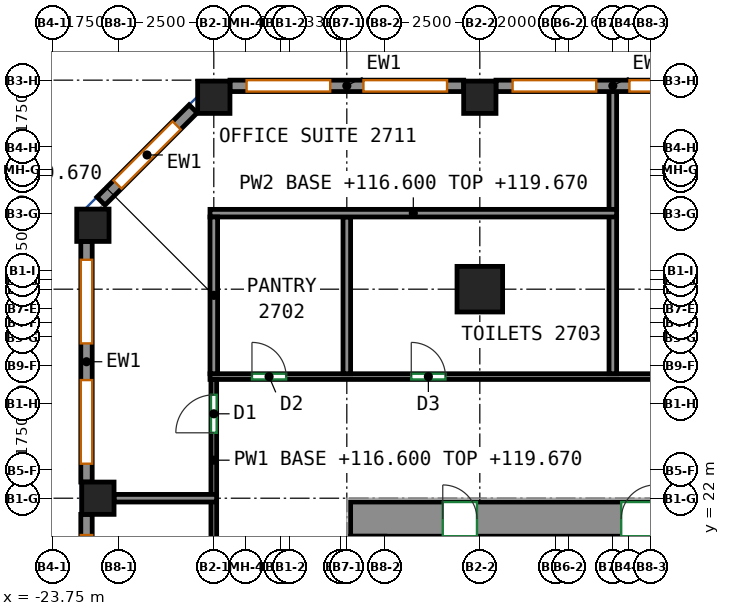
"""IFC4 building model, lengths in metres.
Left out: names, types, materials, properties, quantities, classifications, styles, units other than length and angle.
Written with IfcOpenShell. Run it as: python <this file> out.ifc"""

import sys

from ifc_helpers import new_model, si_unit, direction, frame, frame_2d, origin, origin_2d, place, context, subcontext, project, spatial, rectangle, extrude, source, transform, mapped, element, fill, save


model = new_model("IFC4")
c1 = context("Model", 3, precision=1e-05, world=origin(), true_north=direction((0.0, 1.0)))
c2 = subcontext(c1, "Body", "Model", "MODEL_VIEW")
j1 = project(units=[si_unit("LENGTHUNIT", "METRE"), si_unit("PLANEANGLEUNIT", "RADIAN")], contexts=[c1])
p1 = place(None, origin())
s1 = spatial("IfcSite", under=j1, at=p1, CompositionType="ELEMENT")
p2 = place(p1, origin())
s2 = spatial("IfcBuilding", under=s1, at=p2, CompositionType="ELEMENT")
p3 = place(p2, frame((0.0, 0.0, 116.6)))
s3 = spatial("IfcBuildingStorey", under=s2, at=p3, CompositionType="ELEMENT", Elevation=116.6)
m1 = source(origin(), c2, "Body", "SweptSolid", [
    extrude(rectangle(XDim=0.85, YDim=0.85, at=origin_2d()), origin(), (0.0, 0.0, 1.0), 3.72),
])
for number, where, z_axis, x_axis in (
    (1, (-22.682, 29.182, 0.0), (0.0, 0.0, 1.0), (1.0, 0.0, 0.0)),
    (2, (-22.55, 22.0, 0.0), (0.0, 0.0, 1.0), (1.0, 0.0, 0.0)),
    (3, (-19.5, 32.55, 0.0), (0.0, 0.0, 1.0), (1.0, 0.0, 0.0)),
):
    element("IfcColumn", number, at=place(p3, frame(where, z_axis=z_axis, x_axis=x_axis)), inside=s3, PredefinedType="COLUMN", context=c2, shape_type="MappedRepresentation", body=[
        mapped(m1, transform((0.0, 0.0, 0.0))),
    ])
m2 = source(origin(), c2, "Body", "SweptSolid", [
    extrude(rectangle(XDim=1.2, YDim=1.2, at=origin_2d()), origin(), (0.0, 0.0, 1.0), 3.72),
])
p4 = place(p3, frame((-12.5, 27.5, 0.0), z_axis=(0.0, 0.0, 1.0), x_axis=(1.0, 0.0, 0.0)))
e4 = element("IfcColumn", 4, at=p4, inside=s3, PredefinedType="COLUMN", context=c2, shape_type="MappedRepresentation", body=[
    mapped(m2, transform((0.0, 0.0, 0.0))),
])
p5 = place(p3, frame((-12.5, 32.55, 0.0), z_axis=(0.0, 0.0, 1.0), x_axis=(1.0, 0.0, 0.0)))
e5 = element("IfcColumn", 5, at=p5, inside=s3, PredefinedType="COLUMN", context=c2, shape_type="MappedRepresentation", body=[
    mapped(m1, transform((0.0, 0.0, 0.0))),
])
m3 = source(origin(), c2, "Body", "SweptSolid", [
    extrude(rectangle(XDim=33.9, YDim=0.9, at=frame_2d((16.95, 0.0))), origin(), (0.0, 0.0, 1.0), 3.72),
])
p6 = place(p3, frame((-15.9, 21.45, 0.0), z_axis=(0.0, 0.0, 1.0), x_axis=(1.0, 0.0, 0.0)))
e6 = element("IfcWall", 6, at=p6, inside=s3, PredefinedType="SHEAR", context=c2, shape_type="MappedRepresentation", body=[
    mapped(m3, transform((0.0, 0.0, 0.0))),
])
p7 = place(p6, frame((7.12, 0.0, 0.0)))
e7 = element("IfcOpeningElement", 7, at=p7, cuts=e6, PredefinedType="OPENING", context=c2, shape_type="SweptSolid", body=[
    extrude(rectangle(XDim=0.9, YDim=2.1, at=frame_2d((0.45, 1.05))), frame((0.0, 0.46, 0.0), z_axis=(0.0, -1.0, 0.0), x_axis=(1.0, 0.0, 0.0)), (0.0, 0.0, 1.0), 0.92),
])
p8 = place(p6, frame((11.1, 0.0, 0.0)))
e8 = element("IfcOpeningElement", 8, at=p8, cuts=e6, PredefinedType="OPENING", context=c2, shape_type="SweptSolid", body=[
    extrude(rectangle(XDim=0.9, YDim=2.1, at=frame_2d((0.45, 1.05))), frame((0.0, 0.46, 0.0), z_axis=(0.0, -1.0, 0.0), x_axis=(1.0, 0.0, 0.0)), (0.0, 0.0, 1.0), 0.92),
])
p9 = place(p6, frame((14.45, 0.0, 0.0)))
e9 = element("IfcOpeningElement", 9, at=p9, cuts=e6, PredefinedType="OPENING", context=c2, shape_type="SweptSolid", body=[
    extrude(rectangle(XDim=0.9, YDim=2.1, at=frame_2d((0.45, 1.05))), frame((0.0, 0.46, 0.0), z_axis=(0.0, -1.0, 0.0), x_axis=(1.0, 0.0, 0.0)), (0.0, 0.0, 1.0), 0.92),
])
p10 = place(p6, frame((19.274, 0.0, 0.0)))
e10 = element("IfcOpeningElement", 10, at=p10, cuts=e6, PredefinedType="OPENING", context=c2, shape_type="SweptSolid", body=[
    extrude(rectangle(XDim=0.9, YDim=2.1, at=frame_2d((0.45, 1.05))), frame((0.0, 0.46, 0.0), z_axis=(0.0, -1.0, 0.0), x_axis=(1.0, 0.0, 0.0)), (0.0, 0.0, 1.0), 0.92),
])
p11 = place(p6, frame((25.304, 0.0, 0.0)))
e11 = element("IfcOpeningElement", 11, at=p11, cuts=e6, PredefinedType="OPENING", context=c2, shape_type="SweptSolid", body=[
    extrude(rectangle(XDim=0.9, YDim=2.1, at=frame_2d((0.45, 1.05))), frame((0.0, 0.46, 0.0), z_axis=(0.0, -1.0, 0.0), x_axis=(1.0, 0.0, 0.0)), (0.0, 0.0, 1.0), 0.92),
])
p12 = place(p6, frame((2.425, 0.0, 0.0)))
e12 = element("IfcOpeningElement", 12, at=p12, cuts=e6, PredefinedType="OPENING", context=c2, shape_type="SweptSolid", body=[
    extrude(rectangle(XDim=0.9, YDim=2.1, at=frame_2d((0.45, 1.05))), frame((0.0, 0.46, 0.0), z_axis=(0.0, -1.0, 0.0), x_axis=(1.0, 0.0, 0.0)), (0.0, 0.0, 1.0), 0.92),
])
p13 = place(p6, frame((30.575, 0.0, 0.0)))
e13 = element("IfcOpeningElement", 13, at=p13, cuts=e6, PredefinedType="OPENING", context=c2, shape_type="SweptSolid", body=[
    extrude(rectangle(XDim=0.9, YDim=2.1, at=frame_2d((0.45, 1.05))), frame((0.0, 0.46, 0.0), z_axis=(0.0, -1.0, 0.0), x_axis=(1.0, 0.0, 0.0)), (0.0, 0.0, 1.0), 0.92),
])
m4 = source(origin(), c2, "Body", "SweptSolid", [
    extrude(rectangle(XDim=6.15, YDim=0.3, at=frame_2d((3.075, 0.0))), origin(), (0.0, 0.0, 1.0), 3.72),
])
p14 = place(p3, frame((-5.925, 32.85, 0.0), z_axis=(0.0, 0.0, 1.0), x_axis=(-1.0, 0.0, 0.0)))
e14 = element("IfcWall", 14, at=p14, inside=s3, PredefinedType="SOLIDWALL", context=c2, shape_type="MappedRepresentation", body=[
    mapped(m4, transform((0.0, 0.0, 0.0))),
])
p15 = place(p14, frame((0.438, 0.0, 0.7)))
e15 = element("IfcOpeningElement", 15, at=p15, cuts=e14, PredefinedType="OPENING", context=c2, shape_type="SweptSolid", body=[
    extrude(rectangle(XDim=2.2, YDim=2.25, at=frame_2d((1.1, 1.125))), frame((0.0, 0.16, 0.0), z_axis=(0.0, -1.0, 0.0), x_axis=(1.0, 0.0, 0.0)), (0.0, 0.0, 1.0), 0.32),
])
p16 = place(p14, frame((3.512, 0.0, 0.7)))
e16 = element("IfcOpeningElement", 16, at=p16, cuts=e14, PredefinedType="OPENING", context=c2, shape_type="SweptSolid", body=[
    extrude(rectangle(XDim=2.2, YDim=2.25, at=frame_2d((1.1, 1.125))), frame((0.0, 0.16, 0.0), z_axis=(0.0, -1.0, 0.0), x_axis=(1.0, 0.0, 0.0)), (0.0, 0.0, 1.0), 0.32),
])
p17 = place(p3, frame((-12.925, 32.85, 0.0), z_axis=(0.0, 0.0, 1.0), x_axis=(-1.0, 0.0, 0.0)))
e17 = element("IfcWall", 17, at=p17, inside=s3, PredefinedType="SOLIDWALL", context=c2, shape_type="MappedRepresentation", body=[
    mapped(m4, transform((0.0, 0.0, 0.0))),
])
p18 = place(p17, frame((0.438, 0.0, 0.7)))
e18 = element("IfcOpeningElement", 18, at=p18, cuts=e17, PredefinedType="OPENING", context=c2, shape_type="SweptSolid", body=[
    extrude(rectangle(XDim=2.2, YDim=2.25, at=frame_2d((1.1, 1.125))), frame((0.0, 0.16, 0.0), z_axis=(0.0, -1.0, 0.0), x_axis=(1.0, 0.0, 0.0)), (0.0, 0.0, 1.0), 0.32),
])
p19 = place(p17, frame((3.512, 0.0, 0.7)))
e19 = element("IfcOpeningElement", 19, at=p19, cuts=e17, PredefinedType="OPENING", context=c2, shape_type="SweptSolid", body=[
    extrude(rectangle(XDim=2.2, YDim=2.25, at=frame_2d((1.1, 1.125))), frame((0.0, 0.16, 0.0), z_axis=(0.0, -1.0, 0.0), x_axis=(1.0, 0.0, 0.0)), (0.0, 0.0, 1.0), 0.32),
])
m5 = source(origin(), c2, "Body", "SweptSolid", [
    extrude(rectangle(XDim=3.429, YDim=0.3, at=frame_2d((1.715, 0.0))), origin(), (0.0, 0.0, 1.0), 3.72),
])
p20 = place(p3, frame((-20.044, 32.244, 0.0), z_axis=(0.0, 0.0, 1.0), x_axis=(-0.707106781187, -0.707106781187, 0.0)))
e20 = element("IfcWall", 20, at=p20, inside=s3, PredefinedType="SOLIDWALL", context=c2, shape_type="MappedRepresentation", body=[
    mapped(m5, transform((0.0, 0.0, 0.0))),
])
p21 = place(p20, frame((0.615, 0.0, 0.7)))
e21 = element("IfcOpeningElement", 21, at=p21, cuts=e20, PredefinedType="OPENING", context=c2, shape_type="SweptSolid", body=[
    extrude(rectangle(XDim=2.2, YDim=2.25, at=frame_2d((1.1, 1.125))), frame((0.0, 0.16, 0.0), z_axis=(0.0, -1.0, 0.0), x_axis=(1.0, 0.0, 0.0)), (0.0, 0.0, 1.0), 0.32),
])
m6 = source(origin(), c2, "Body", "SweptSolid", [
    extrude(rectangle(XDim=6.332, YDim=0.3, at=frame_2d((3.166, 0.0))), origin(), (0.0, 0.0, 1.0), 3.72),
])
p22 = place(p3, frame((-22.85, 28.757, 0.0), z_axis=(0.0, 0.0, 1.0), x_axis=(0.0, -1.0, 0.0)))
e22 = element("IfcWall", 22, at=p22, inside=s3, PredefinedType="SOLIDWALL", context=c2, shape_type="MappedRepresentation", body=[
    mapped(m6, transform((0.0, 0.0, 0.0))),
])
p23 = place(p22, frame((0.483, 0.0, 0.7)))
e23 = element("IfcOpeningElement", 23, at=p23, cuts=e22, PredefinedType="OPENING", context=c2, shape_type="SweptSolid", body=[
    extrude(rectangle(XDim=2.2, YDim=2.25, at=frame_2d((1.1, 1.125))), frame((0.0, 0.16, 0.0), z_axis=(0.0, -1.0, 0.0), x_axis=(1.0, 0.0, 0.0)), (0.0, 0.0, 1.0), 0.32),
])
p24 = place(p22, frame((3.649, 0.0, 0.7)))
e24 = element("IfcOpeningElement", 24, at=p24, cuts=e22, PredefinedType="OPENING", context=c2, shape_type="SweptSolid", body=[
    extrude(rectangle(XDim=2.2, YDim=2.25, at=frame_2d((1.1, 1.125))), frame((0.0, 0.16, 0.0), z_axis=(0.0, -1.0, 0.0), x_axis=(1.0, 0.0, 0.0)), (0.0, 0.0, 1.0), 0.32),
])
m7 = source(origin(), c2, "Body", "SweptSolid", [
    extrude(rectangle(XDim=13.15, YDim=0.3, at=frame_2d((6.575, 0.0))), origin(), (0.0, 0.0, 1.0), 3.72),
])
p25 = place(p3, frame((-22.85, 21.575, 0.0), z_axis=(0.0, 0.0, 1.0), x_axis=(0.0, -1.0, 0.0)))
e25 = element("IfcWall", 25, at=p25, inside=s3, PredefinedType="SOLIDWALL", context=c2, shape_type="MappedRepresentation", body=[
    mapped(m7, transform((0.0, 0.0, 0.0))),
])
p26 = place(p25, frame((0.544, 0.0, 0.7)))
e26 = element("IfcOpeningElement", 26, at=p26, cuts=e25, PredefinedType="OPENING", context=c2, shape_type="SweptSolid", body=[
    extrude(rectangle(XDim=2.2, YDim=2.25, at=frame_2d((1.1, 1.125))), frame((0.0, 0.16, 0.0), z_axis=(0.0, -1.0, 0.0), x_axis=(1.0, 0.0, 0.0)), (0.0, 0.0, 1.0), 0.32),
])
p27 = place(p25, frame((3.831, 0.0, 0.7)))
e27 = element("IfcOpeningElement", 27, at=p27, cuts=e25, PredefinedType="OPENING", context=c2, shape_type="SweptSolid", body=[
    extrude(rectangle(XDim=2.2, YDim=2.25, at=frame_2d((1.1, 1.125))), frame((0.0, 0.16, 0.0), z_axis=(0.0, -1.0, 0.0), x_axis=(1.0, 0.0, 0.0)), (0.0, 0.0, 1.0), 0.32),
])
p28 = place(p25, frame((7.119, 0.0, 0.7)))
e28 = element("IfcOpeningElement", 28, at=p28, cuts=e25, PredefinedType="OPENING", context=c2, shape_type="SweptSolid", body=[
    extrude(rectangle(XDim=2.2, YDim=2.25, at=frame_2d((1.1, 1.125))), frame((0.0, 0.16, 0.0), z_axis=(0.0, -1.0, 0.0), x_axis=(1.0, 0.0, 0.0)), (0.0, 0.0, 1.0), 0.32),
])
p29 = place(p25, frame((10.406, 0.0, 0.7)))
e29 = element("IfcOpeningElement", 29, at=p29, cuts=e25, PredefinedType="OPENING", context=c2, shape_type="SweptSolid", body=[
    extrude(rectangle(XDim=2.2, YDim=2.25, at=frame_2d((1.1, 1.125))), frame((0.0, 0.16, 0.0), z_axis=(0.0, -1.0, 0.0), x_axis=(1.0, 0.0, 0.0)), (0.0, 0.0, 1.0), 0.32),
])
p30 = place(p3, frame((-19.6, 25.2, 0.0), z_axis=(0.0, 0.0, 1.0), x_axis=(1.0, 0.0, 0.0)))
e30 = element("IfcWall", 30, at=p30, inside=s3, PredefinedType="PARTITIONING", context=c2, shape_type="SweptSolid", body=[
    extrude(rectangle(XDim=40.175, YDim=0.15, at=frame_2d((20.087, 0.0))), origin(), (0.0, 0.0, 1.0), 3.72),
])
p31 = place(p30, frame((1.104, 0.0, 0.0)))
e31 = element("IfcOpeningElement", 31, at=p31, cuts=e30, PredefinedType="OPENING", context=c2, shape_type="SweptSolid", body=[
    extrude(rectangle(XDim=0.9, YDim=2.1, at=frame_2d((0.45, 1.05))), frame((0.0, 0.085, 0.0), z_axis=(0.0, -1.0, 0.0), x_axis=(1.0, 0.0, 0.0)), (0.0, 0.0, 1.0), 0.17),
])
p32 = place(p30, frame((5.296, 0.0, 0.0)))
e32 = element("IfcOpeningElement", 32, at=p32, cuts=e30, PredefinedType="OPENING", context=c2, shape_type="SweptSolid", body=[
    extrude(rectangle(XDim=0.9, YDim=2.1, at=frame_2d((0.45, 1.05))), frame((0.0, 0.085, 0.0), z_axis=(0.0, -1.0, 0.0), x_axis=(1.0, 0.0, 0.0)), (0.0, 0.0, 1.0), 0.17),
])
p33 = place(p30, frame((18.302, 0.0, 0.0)))
e33 = element("IfcOpeningElement", 33, at=p33, cuts=e30, PredefinedType="OPENING", context=c2, shape_type="SweptSolid", body=[
    extrude(rectangle(XDim=1.0, YDim=2.1, at=frame_2d((0.5, 1.05))), frame((0.0, 0.085, 0.0), z_axis=(0.0, -1.0, 0.0), x_axis=(1.0, 0.0, 0.0)), (0.0, 0.0, 1.0), 0.17),
])
p34 = place(p30, frame((30.209, 0.0, 0.0)))
e34 = element("IfcOpeningElement", 34, at=p34, cuts=e30, PredefinedType="OPENING", context=c2, shape_type="SweptSolid", body=[
    extrude(rectangle(XDim=0.9, YDim=2.1, at=frame_2d((0.45, 1.05))), frame((0.0, 0.085, 0.0), z_axis=(0.0, -1.0, 0.0), x_axis=(1.0, 0.0, 0.0)), (0.0, 0.0, 1.0), 0.17),
])
p35 = place(p30, frame((32.702, 0.0, 0.0)))
e35 = element("IfcOpeningElement", 35, at=p35, cuts=e30, PredefinedType="OPENING", context=c2, shape_type="SweptSolid", body=[
    extrude(rectangle(XDim=1.8, YDim=2.1, at=frame_2d((0.9, 1.05))), frame((0.0, 0.085, 0.0), z_axis=(0.0, -1.0, 0.0), x_axis=(1.0, 0.0, 0.0)), (0.0, 0.0, 1.0), 0.17),
])
p36 = place(p3, frame((-19.5, 22.09, 0.0), z_axis=(0.0, 0.0, 1.0), x_axis=(0.0, 1.0, 0.0)))
e36 = element("IfcWall", 36, at=p36, inside=s3, PredefinedType="PARTITIONING", context=c2, shape_type="SweptSolid", body=[
    extrude(rectangle(XDim=3.035, YDim=0.15, at=frame_2d((1.518, 0.0))), origin(), (0.0, 0.0, 1.0), 3.07),
])
p37 = place(p36, frame((1.631, 0.0, 0.0)))
e37 = element("IfcOpeningElement", 37, at=p37, cuts=e36, PredefinedType="OPENING", context=c2, shape_type="SweptSolid", body=[
    extrude(rectangle(XDim=1.0, YDim=2.1, at=frame_2d((0.5, 1.05))), frame((0.0, 0.085, 0.0), z_axis=(0.0, -1.0, 0.0), x_axis=(1.0, 0.0, 0.0)), (0.0, 0.0, 1.0), 0.17),
])
p38 = place(p3, frame((-19.5, 8.09, 0.0), z_axis=(0.0, 0.0, 1.0), x_axis=(0.0, 1.0, 0.0)))
e38 = element("IfcWall", 38, at=p38, inside=s3, PredefinedType="PARTITIONING", context=c2, shape_type="SweptSolid", body=[
    extrude(rectangle(XDim=13.82, YDim=0.15, at=frame_2d((6.91, 0.0))), origin(), (0.0, 0.0, 1.0), 3.07),
])
p39 = place(p38, frame((9.214, 0.0, 0.0)))
e39 = element("IfcOpeningElement", 39, at=p39, cuts=e38, PredefinedType="OPENING", context=c2, shape_type="SweptSolid", body=[
    extrude(rectangle(XDim=0.9, YDim=2.1, at=frame_2d((0.45, 1.05))), frame((0.0, 0.085, 0.0), z_axis=(0.0, -1.0, 0.0), x_axis=(1.0, 0.0, 0.0)), (0.0, 0.0, 1.0), 0.17),
])
p40 = place(p3, frame((-9.0, 25.276, 0.0), z_axis=(0.0, 0.0, 1.0), x_axis=(0.0, 1.0, 0.0)))
e40 = element("IfcWall", 40, at=p40, inside=s3, PredefinedType="PARTITIONING", context=c2, shape_type="SweptSolid", body=[
    extrude(rectangle(XDim=4.134, YDim=0.2, at=frame_2d((2.067, 0.0))), origin(), (0.0, 0.0, 1.0), 3.72),
])
p41 = place(p3, frame((-9.0, 29.59, 0.0), z_axis=(0.0, 0.0, 1.0), x_axis=(0.0, 1.0, 0.0)))
e41 = element("IfcWall", 41, at=p41, inside=s3, PredefinedType="PARTITIONING", context=c2, shape_type="SweptSolid", body=[
    extrude(rectangle(XDim=3.16, YDim=0.2, at=frame_2d((1.58, 0.0))), origin(), (0.0, 0.0, 1.0), 3.72),
])
p42 = place(p3, frame((-16.0, 29.4, 0.0), z_axis=(0.0, 0.0, 1.0), x_axis=(0.0, -1.0, 0.0)))
e42 = element("IfcWall", 42, at=p42, inside=s3, PredefinedType="PARTITIONING", context=c2, shape_type="SweptSolid", body=[
    extrude(rectangle(XDim=4.124, YDim=0.2, at=frame_2d((2.062, 0.0))), origin(), (0.0, 0.0, 1.0), 3.72),
])
p43 = place(p3, frame((-19.6, 29.5, 0.0), z_axis=(0.0, 0.0, 1.0), x_axis=(1.0, 0.0, 0.0)))
e43 = element("IfcWall", 43, at=p43, inside=s3, PredefinedType="PARTITIONING", context=c2, shape_type="SweptSolid", body=[
    extrude(rectangle(XDim=10.7, YDim=0.2, at=frame_2d((5.35, 0.0))), origin(), (0.0, 0.0, 1.0), 3.07),
])
p44 = place(p3, frame((-19.5, 29.4, 0.0), z_axis=(0.0, 0.0, 1.0), x_axis=(0.0, -1.0, 0.0)))
e44 = element("IfcWall", 44, at=p44, inside=s3, PredefinedType="PARTITIONING", context=c2, shape_type="SweptSolid", body=[
    extrude(rectangle(XDim=4.124, YDim=0.2, at=frame_2d((2.062, 0.0))), origin(), (0.0, 0.0, 1.0), 3.07),
])
p45 = place(p3, frame((-22.125, 22.0, 0.0), z_axis=(0.0, 0.0, 1.0), x_axis=(1.0, 0.0, 0.0)))
e45 = element("IfcWall", 45, at=p45, inside=s3, PredefinedType="PARTITIONING", context=c2, shape_type="SweptSolid", body=[
    extrude(rectangle(XDim=2.699, YDim=0.2, at=frame_2d((1.35, 0.0))), origin(), (0.0, 0.0, 1.0), 3.72),
])
p46 = place(p15, origin())
e46 = element("IfcWindow", 46, at=p46, inside=s3, PartitioningType="SINGLE_PANEL", PredefinedType="WINDOW", context=c2, shape_type="SweptSolid", body=[
    extrude(rectangle(XDim=2.2, YDim=2.25, at=frame_2d((1.1, 1.125))), frame((0.0, 0.03, 0.0), z_axis=(0.0, -1.0, 0.0), x_axis=(1.0, 0.0, 0.0)), (0.0, 0.0, 1.0), 0.06),
])
fill(e15, e46)
p47 = place(p16, origin())
e47 = element("IfcWindow", 47, at=p47, inside=s3, PartitioningType="SINGLE_PANEL", PredefinedType="WINDOW", context=c2, shape_type="SweptSolid", body=[
    extrude(rectangle(XDim=2.2, YDim=2.25, at=frame_2d((1.1, 1.125))), frame((0.0, 0.03, 0.0), z_axis=(0.0, -1.0, 0.0), x_axis=(1.0, 0.0, 0.0)), (0.0, 0.0, 1.0), 0.06),
])
fill(e16, e47)
p48 = place(p18, origin())
e48 = element("IfcWindow", 48, at=p48, inside=s3, PartitioningType="SINGLE_PANEL", PredefinedType="WINDOW", context=c2, shape_type="SweptSolid", body=[
    extrude(rectangle(XDim=2.2, YDim=2.25, at=frame_2d((1.1, 1.125))), frame((0.0, 0.03, 0.0), z_axis=(0.0, -1.0, 0.0), x_axis=(1.0, 0.0, 0.0)), (0.0, 0.0, 1.0), 0.06),
])
fill(e18, e48)
p49 = place(p19, origin())
e49 = element("IfcWindow", 49, at=p49, inside=s3, PartitioningType="SINGLE_PANEL", PredefinedType="WINDOW", context=c2, shape_type="SweptSolid", body=[
    extrude(rectangle(XDim=2.2, YDim=2.25, at=frame_2d((1.1, 1.125))), frame((0.0, 0.03, 0.0), z_axis=(0.0, -1.0, 0.0), x_axis=(1.0, 0.0, 0.0)), (0.0, 0.0, 1.0), 0.06),
])
fill(e19, e49)
p50 = place(p21, origin())
e50 = element("IfcWindow", 50, at=p50, inside=s3, PartitioningType="SINGLE_PANEL", PredefinedType="WINDOW", context=c2, shape_type="SweptSolid", body=[
    extrude(rectangle(XDim=2.2, YDim=2.25, at=frame_2d((1.1, 1.125))), frame((0.0, 0.03, 0.0), z_axis=(0.0, -1.0, 0.0), x_axis=(1.0, 0.0, 0.0)), (0.0, 0.0, 1.0), 0.06),
])
fill(e21, e50)
p51 = place(p23, origin())
e51 = element("IfcWindow", 51, at=p51, inside=s3, PartitioningType="SINGLE_PANEL", PredefinedType="WINDOW", context=c2, shape_type="SweptSolid", body=[
    extrude(rectangle(XDim=2.2, YDim=2.25, at=frame_2d((1.1, 1.125))), frame((0.0, 0.03, 0.0), z_axis=(0.0, -1.0, 0.0), x_axis=(1.0, 0.0, 0.0)), (0.0, 0.0, 1.0), 0.06),
])
fill(e23, e51)
p52 = place(p24, origin())
e52 = element("IfcWindow", 52, at=p52, inside=s3, PartitioningType="SINGLE_PANEL", PredefinedType="WINDOW", context=c2, shape_type="SweptSolid", body=[
    extrude(rectangle(XDim=2.2, YDim=2.25, at=frame_2d((1.1, 1.125))), frame((0.0, 0.03, 0.0), z_axis=(0.0, -1.0, 0.0), x_axis=(1.0, 0.0, 0.0)), (0.0, 0.0, 1.0), 0.06),
])
fill(e24, e52)
p53 = place(p26, origin())
e53 = element("IfcWindow", 53, at=p53, inside=s3, PartitioningType="SINGLE_PANEL", PredefinedType="WINDOW", context=c2, shape_type="SweptSolid", body=[
    extrude(rectangle(XDim=2.2, YDim=2.25, at=frame_2d((1.1, 1.125))), frame((0.0, 0.03, 0.0), z_axis=(0.0, -1.0, 0.0), x_axis=(1.0, 0.0, 0.0)), (0.0, 0.0, 1.0), 0.06),
])
fill(e26, e53)
p54 = place(p7, origin())
e54 = element("IfcDoor", 54, at=p54, inside=s3, OperationType="SINGLE_SWING_RIGHT", PredefinedType="DOOR", context=c2, shape_type="SweptSolid", body=[
    extrude(rectangle(XDim=0.9, YDim=2.1, at=frame_2d((0.45, 1.05))), frame((0.0, -0.305, 0.0), z_axis=(0.0, -1.0, 0.0), x_axis=(1.0, 0.0, 0.0)), (0.0, 0.0, 1.0), 0.05),
])
fill(e7, e54)
p55 = place(p12, origin())
e55 = element("IfcDoor", 55, at=p55, inside=s3, OperationType="SINGLE_SWING_LEFT", PredefinedType="DOOR", context=c2, shape_type="SweptSolid", body=[
    extrude(rectangle(XDim=0.9, YDim=2.1, at=frame_2d((0.45, 1.05))), frame((0.0, -0.305, 0.0), z_axis=(0.0, -1.0, 0.0), x_axis=(1.0, 0.0, 0.0)), (0.0, 0.0, 1.0), 0.05),
])
fill(e12, e55)
p56 = place(p37, origin())
e56 = element("IfcDoor", 56, at=p56, inside=s3, OperationType="SINGLE_SWING_LEFT", PredefinedType="DOOR", context=c2, shape_type="SweptSolid", body=[
    extrude(rectangle(XDim=1.0, YDim=2.1, at=frame_2d((0.5, 1.05))), frame((0.0, 0.025, 0.0), z_axis=(0.0, -1.0, 0.0), x_axis=(1.0, 0.0, 0.0)), (0.0, 0.0, 1.0), 0.05),
])
fill(e37, e56)
p57 = place(p31, origin())
e57 = element("IfcDoor", 57, at=p57, inside=s3, OperationType="SINGLE_SWING_LEFT", PredefinedType="DOOR", context=c2, shape_type="SweptSolid", body=[
    extrude(rectangle(XDim=0.9, YDim=2.1, at=frame_2d((0.45, 1.05))), frame((0.0, 0.025, 0.0), z_axis=(0.0, -1.0, 0.0), x_axis=(1.0, 0.0, 0.0)), (0.0, 0.0, 1.0), 0.05),
])
fill(e31, e57)
p58 = place(p32, origin())
e58 = element("IfcDoor", 58, at=p58, inside=s3, OperationType="SINGLE_SWING_LEFT", PredefinedType="DOOR", context=c2, shape_type="SweptSolid", body=[
    extrude(rectangle(XDim=0.9, YDim=2.1, at=frame_2d((0.45, 1.05))), frame((0.0, 0.025, 0.0), z_axis=(0.0, -1.0, 0.0), x_axis=(1.0, 0.0, 0.0)), (0.0, 0.0, 1.0), 0.05),
])
fill(e32, e58)
save(model, sys.argv[1])
